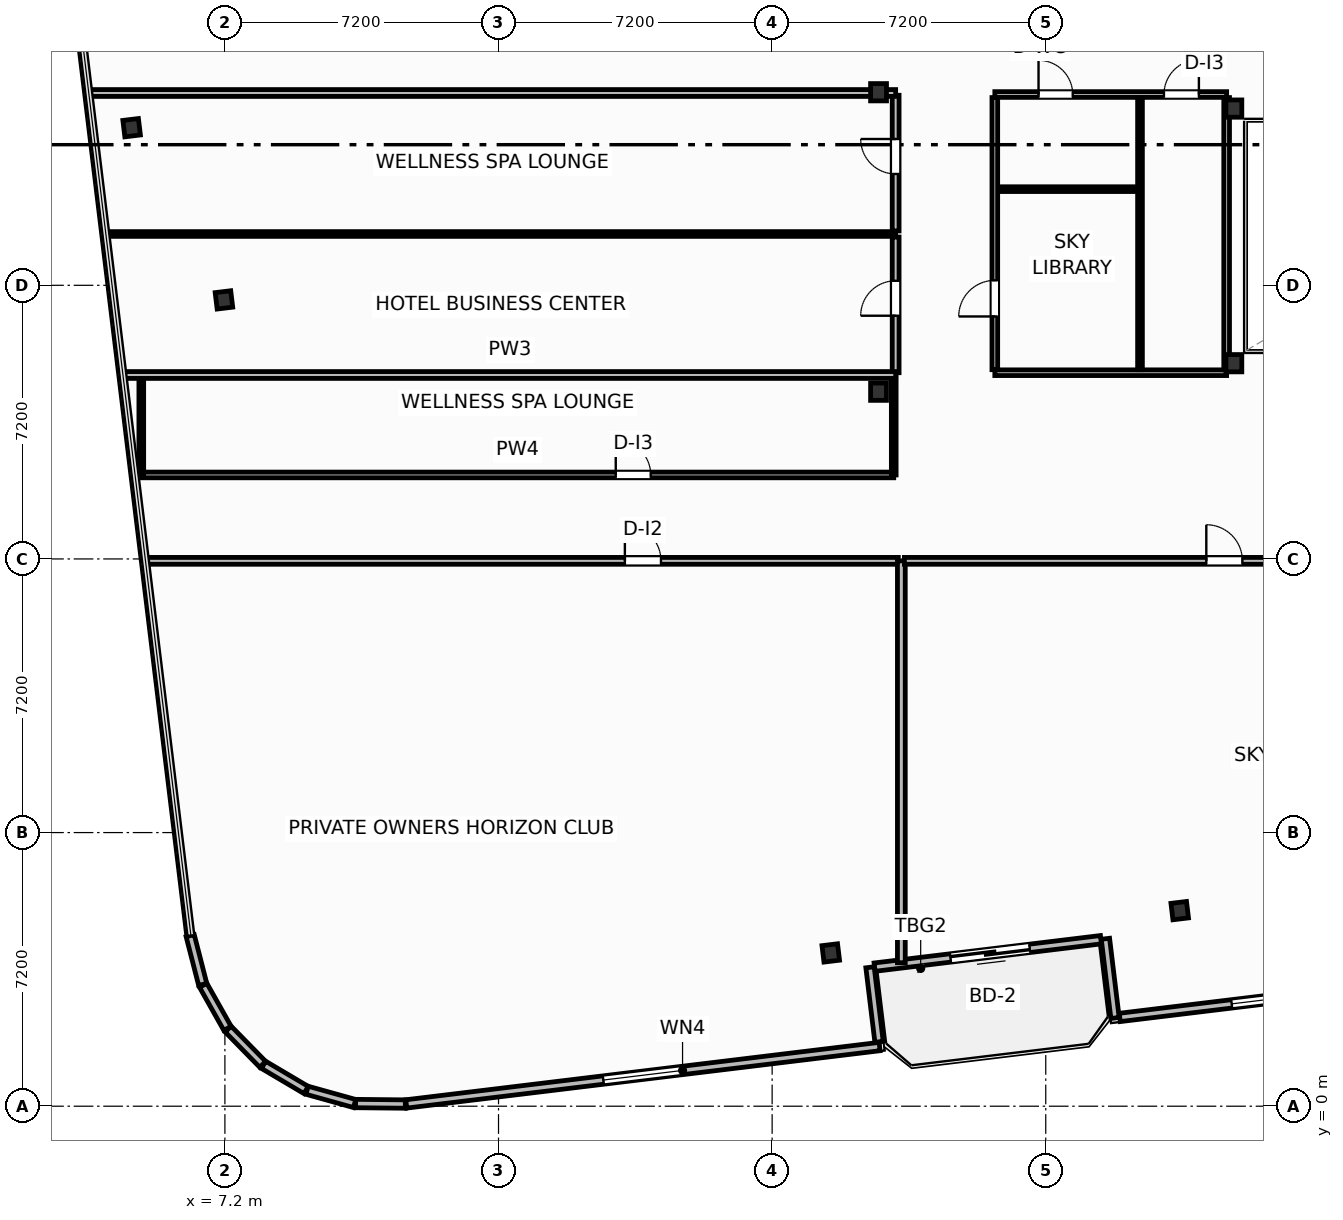
"""IFC4 building model, lengths in metres.
Left out: names, types, materials, properties, quantities, classifications, styles, units other than length and angle.
Written with IfcOpenShell. Run it as: python <this file> out.ifc"""

import sys

from ifc_helpers import new_model, si_unit, direction, frame, frame_2d, origin, origin_2d, place, context, subcontext, project, spatial, rectangle, i_section, extrude, element, fill, save


model = new_model("IFC4")
c1 = context("Model", 3, precision=1e-05, world=origin(), true_north=direction((0.0, 1.0)))
c2 = subcontext(c1, "Body", "Model", "MODEL_VIEW")
j1 = project(units=[si_unit("LENGTHUNIT", "METRE"), si_unit("PLANEANGLEUNIT", "RADIAN")], contexts=[c1])
p1 = place(None, origin())
s1 = spatial("IfcSite", under=j1, at=p1, CompositionType="ELEMENT")
p2 = place(p1, origin())
s2 = spatial("IfcBuilding", under=s1, at=p2, CompositionType="ELEMENT")
p3 = place(p2, frame((0.0, 0.0, 185.7)))
s3 = spatial("IfcBuildingStorey", under=s2, at=p3, CompositionType="ELEMENT", Elevation=185.7)
for number, where, z_axis, x_axis in (
    (1, (33.75, 19.55, 0.0), (0.0, 0.0, 1.0), (1.0, 0.0, 0.0)),
    (2, (33.75, 26.25, 0.0), (0.0, 0.0, 1.0), (1.0, 0.0, 0.0)),
    (3, (24.4, 18.8, 0.0), (0.0, 0.0, 1.0), (1.0, 0.0, 0.0)),
    (4, (24.4, 26.68, 0.0), (0.0, 0.0, 1.0), (1.0, 0.0, 0.0)),
):
    element("IfcColumn", number, at=place(p3, frame(where, z_axis=z_axis, x_axis=x_axis)), inside=s3, PredefinedType="COLUMN", context=c2, shape_type="SweptSolid", body=[
        extrude(i_section(OverallWidth=0.418, OverallDepth=0.455, WebThickness=0.042, FlangeThickness=0.068, FilletRadius=0.025, at=origin_2d()), origin(), (0.0, 0.0, 1.0), 3.7),
    ])
for number, where, z_axis, x_axis in (
    (5, (23.143, 4.033, 0.0), (0.0, 0.0, 1.0), (0.993, 0.12, 0.0)),
    (6, (32.325, 5.146, 0.0), (0.0, 0.0, 1.0), (0.993, 0.12, 0.0)),
    (7, (4.746, 25.747, 0.0), (0.0, 0.0, 1.0), (0.993, 0.12, 0.0)),
    (8, (7.175, 21.216, 0.0), (0.0, 0.0, 1.0), (0.993, 0.12, 0.0)),
):
    element("IfcColumn", number, at=place(p3, frame(where, z_axis=z_axis, x_axis=x_axis)), inside=s3, PredefinedType="COLUMN", context=c2, shape_type="SweptSolid", body=[
        extrude(i_section(OverallWidth=0.412, OverallDepth=0.435, WebThickness=0.036, FlangeThickness=0.057, FilletRadius=0.025, at=origin_2d()), origin(), (0.0, 0.0, 1.0), 3.7),
    ])
p4 = place(p3, frame((30.252, 4.381, 0.0), z_axis=(0.0, 0.0, 1.0), x_axis=(-0.992735402148, -0.120318000826, 0.0)))
e9 = element("IfcWall", 9, at=p4, inside=s3, PredefinedType="SOLIDWALL", context=c2, shape_type="SweptSolid", body=[
    extrude(rectangle(XDim=6.0, YDim=0.22, at=frame_2d((3.0, 0.0))), origin(), (0.0, 0.0, 1.0), 2.73),
])
p5 = place(p4, frame((1.888, 0.0, 0.0)))
e10 = element("IfcOpeningElement", 10, at=p5, cuts=e9, PredefinedType="OPENING", context=c2, shape_type="SweptSolid", body=[
    extrude(rectangle(XDim=2.1, YDim=2.3, at=frame_2d((1.05, 1.15))), frame((0.0, 0.12, 0.0), z_axis=(0.0, -1.0, 0.0), x_axis=(1.0, 0.0, 0.0)), (0.0, 0.0, 1.0), 0.24),
])
p6 = place(p3, frame((6.286, 4.488, 0.0), z_axis=(0.0, 0.0, 1.0), x_axis=(0.248942347653, -0.968518305219, 0.0)))
e11 = element("IfcWall", 11, at=p6, inside=s3, PredefinedType="SOLIDWALL", context=c2, shape_type="SweptSolid", body=[
    extrude(rectangle(XDim=1.326, YDim=0.22, at=frame_2d((0.663, 0.0))), origin(), (0.0, 0.0, 1.0), 2.73),
])
for number, where, z_axis, x_axis in (
    (12, (6.629, 3.182, 0.0), (0.0, 0.0, 1.0), (0.491, -0.871, 0.0)),
    (13, (7.285, 2.031, 0.0), (0.0, 0.0, 1.0), (0.7, -0.714, 0.0)),
    (14, (8.217, 1.089, 0.0), (0.0, 0.0, 1.0), (0.861, -0.509, 0.0)),
):
    element("IfcWall", number, at=place(p3, frame(where, z_axis=z_axis, x_axis=x_axis)), inside=s3, PredefinedType="SOLIDWALL", context=c2, shape_type="SweptSolid", body=[
        extrude(rectangle(XDim=1.301, YDim=0.22, at=frame_2d((0.65, 0.0))), origin(), (0.0, 0.0, 1.0), 2.73),
    ])
p7 = place(p3, frame((9.361, 0.42, 0.0), z_axis=(0.0, 0.0, 1.0), x_axis=(0.963218895288, -0.268717992997, 0.0)))
e15 = element("IfcWall", 15, at=p7, inside=s3, PredefinedType="SOLIDWALL", context=c2, shape_type="SweptSolid", body=[
    extrude(rectangle(XDim=1.301, YDim=0.22, at=frame_2d((0.65, 0.0))), origin(), (0.0, 0.0, 1.0), 2.73),
])
p8 = place(p3, frame((10.639, 0.07, 0.0), z_axis=(0.0, 0.0, 1.0), x_axis=(0.999947377741, -0.010258740119, 0.0)))
e16 = element("IfcWall", 16, at=p8, inside=s3, PredefinedType="SOLIDWALL", context=c2, shape_type="SweptSolid", body=[
    extrude(rectangle(XDim=1.309, YDim=0.22, at=frame_2d((0.654, 0.0))), origin(), (0.0, 0.0, 1.0), 2.73),
])
p9 = place(p3, frame((11.972, 0.06, 0.0), z_axis=(0.0, 0.0, 1.0), x_axis=(0.992732021049, 0.120345894751, 0.0)))
e17 = element("IfcWall", 17, at=p9, inside=s3, PredefinedType="SOLIDWALL", context=c2, shape_type="SweptSolid", body=[
    extrude(rectangle(XDim=12.547, YDim=0.22, at=frame_2d((6.274, 0.0))), origin(), (0.0, 0.0, 1.0), 2.73),
])
p10 = place(p9, frame((5.224, 0.0, 0.8)))
e18 = element("IfcOpeningElement", 18, at=p10, cuts=e17, PredefinedType="OPENING", context=c2, shape_type="SweptSolid", body=[
    extrude(rectangle(XDim=2.1, YDim=1.75, at=frame_2d((1.05, 0.875))), frame((0.0, 0.12, 0.0), z_axis=(0.0, -1.0, 0.0), x_axis=(1.0, 0.0, 0.0)), (0.0, 0.0, 1.0), 0.24),
])
p11 = place(p3, frame((24.413, 1.694, 0.0), z_axis=(0.0, 0.0, 1.0), x_axis=(-0.120290754542, 0.992738703976, 0.0)))
e19 = element("IfcWall", 19, at=p11, inside=s3, PredefinedType="SOLIDWALL", context=c2, shape_type="SweptSolid", body=[
    extrude(rectangle(XDim=1.975, YDim=0.22, at=frame_2d((0.987, 0.0))), origin(), (0.0, 0.0, 1.0), 2.73),
])
p12 = place(p3, frame((30.37, 4.406, 0.0), z_axis=(0.0, 0.0, 1.0), x_axis=(0.120327895535, -0.992734202874, 0.0)))
e20 = element("IfcWall", 20, at=p12, inside=s3, PredefinedType="SOLIDWALL", context=c2, shape_type="SweptSolid", body=[
    extrude(rectangle(XDim=2.1, YDim=0.22, at=frame_2d((1.05, 0.0))), origin(), (0.0, 0.0, 1.0), 2.73),
])
p13 = place(p3, frame((30.747, 2.336, 0.0), z_axis=(0.0, 0.0, 1.0), x_axis=(0.992731032022, 0.120354052946, 0.0)))
e21 = element("IfcWall", 21, at=p13, inside=s3, PredefinedType="SOLIDWALL", context=c2, shape_type="SweptSolid", body=[
    extrude(rectangle(XDim=8.035, YDim=0.22, at=frame_2d((4.018, 0.0))), origin(), (0.0, 0.0, 1.0), 2.73),
])
p14 = place(p13, frame((2.968, 0.0, 0.8)))
e22 = element("IfcOpeningElement", 22, at=p14, cuts=e21, PredefinedType="OPENING", context=c2, shape_type="SweptSolid", body=[
    extrude(rectangle(XDim=2.1, YDim=1.75, at=frame_2d((1.05, 0.875))), frame((0.0, 0.12, 0.0), z_axis=(0.0, -1.0, 0.0), x_axis=(1.0, 0.0, 0.0)), (0.0, 0.0, 1.0), 0.24),
])
p15 = place(p3, frame((5.0, 16.61, 0.0), z_axis=(0.0, 0.0, 1.0), x_axis=(1.0, 0.0, 0.0)))
e23 = element("IfcWall", 23, at=p15, inside=s3, PredefinedType="PARTITIONING", context=c2, shape_type="SweptSolid", body=[
    extrude(rectangle(XDim=19.8, YDim=0.15, at=frame_2d((9.9, 0.0))), origin(), (0.0, 0.0, 1.0), 3.45),
])
p16 = place(p15, frame((12.485, 0.0, 0.0)))
e24 = element("IfcOpeningElement", 24, at=p16, cuts=e23, PredefinedType="OPENING", context=c2, shape_type="SweptSolid", body=[
    extrude(rectangle(XDim=0.92, YDim=2.05, at=frame_2d((0.46, 1.025))), frame((0.0, 0.085, 0.0), z_axis=(0.0, -1.0, 0.0), x_axis=(1.0, 0.0, 0.0)), (0.0, 0.0, 1.0), 0.17),
])
for number, where, z_axis, x_axis in (
    (25, (5.0, 16.61, 0.0), (0.0, 0.0, 1.0), (0.0, 1.0, 0.0)),
    (26, (24.8, 16.61, 0.0), (0.0, 0.0, 1.0), (0.0, 1.0, 0.0)),
):
    element("IfcWall", number, at=place(p3, frame(where, z_axis=z_axis, x_axis=x_axis)), inside=s3, PredefinedType="PARTITIONING", context=c2, shape_type="SweptSolid", body=[
        extrude(rectangle(XDim=2.63, YDim=0.125, at=frame_2d((1.315, 0.0))), origin(), (0.0, 0.0, 1.0), 3.45),
    ])
p17 = place(p3, frame((5.15, 14.35, 0.0), z_axis=(0.0, 0.0, 1.0), x_axis=(1.0, 0.0, 0.0)))
e27 = element("IfcWall", 27, at=p17, inside=s3, PredefinedType="PARTITIONING", context=c2, shape_type="SweptSolid", body=[
    extrude(rectangle(XDim=19.77, YDim=0.18, at=frame_2d((9.885, 0.0))), origin(), (0.0, 0.0, 1.0), 3.45),
])
p18 = place(p17, frame((12.575, 0.0, 0.0)))
e28 = element("IfcOpeningElement", 28, at=p18, cuts=e27, PredefinedType="OPENING", context=c2, shape_type="SweptSolid", body=[
    extrude(rectangle(XDim=0.95, YDim=2.05, at=frame_2d((0.475, 1.025))), frame((0.0, 0.1, 0.0), z_axis=(0.0, -1.0, 0.0), x_axis=(1.0, 0.0, 0.0)), (0.0, 0.0, 1.0), 0.2),
])
p19 = place(p3, frame((25.0, 3.775, 0.0), z_axis=(0.0, 0.0, 1.0), x_axis=(0.0, 1.0, 0.0)))
e29 = element("IfcWall", 29, at=p19, inside=s3, PredefinedType="PARTITIONING", context=c2, shape_type="SweptSolid", body=[
    extrude(rectangle(XDim=10.575, YDim=0.205, at=frame_2d((5.288, 0.0))), origin(), (0.0, 0.0, 1.0), 3.45),
])
p20 = place(p3, frame((25.08, 14.35, 0.0), z_axis=(0.0, 0.0, 1.0), x_axis=(1.0, 0.0, 0.0)))
e30 = element("IfcWall", 30, at=p20, inside=s3, PredefinedType="PARTITIONING", context=c2, shape_type="SweptSolid", body=[
    extrude(rectangle(XDim=16.84, YDim=0.18, at=frame_2d((8.42, 0.0))), origin(), (0.0, 0.0, 1.0), 3.45),
])
p21 = place(p20, frame((7.945, 0.0, 0.0)))
e31 = element("IfcOpeningElement", 31, at=p21, cuts=e30, PredefinedType="OPENING", context=c2, shape_type="SweptSolid", body=[
    extrude(rectangle(XDim=0.95, YDim=2.05, at=frame_2d((0.475, 1.025))), frame((0.0, 0.1, 0.0), z_axis=(0.0, -1.0, 0.0), x_axis=(1.0, 0.0, 0.0)), (0.0, 0.0, 1.0), 0.2),
])
p22 = place(p3, frame((24.85, 19.3, 0.0), z_axis=(0.0, 0.0, 1.0), x_axis=(0.0, 1.0, 0.0)))
e32 = element("IfcWall", 32, at=p22, inside=s3, PredefinedType="PARTITIONING", context=c2, shape_type="SweptSolid", body=[
    extrude(rectangle(XDim=3.57, YDim=0.18, at=frame_2d((1.785, 0.0))), origin(), (0.0, 0.0, 1.0), 3.45),
])
p23 = place(p22, frame((1.5, 0.0, 0.0)))
e33 = element("IfcOpeningElement", 33, at=p23, cuts=e32, PredefinedType="OPENING", context=c2, shape_type="SweptSolid", body=[
    extrude(rectangle(XDim=0.92, YDim=2.05, at=frame_2d((0.46, 1.025))), frame((0.0, 0.1, 0.0), z_axis=(0.0, -1.0, 0.0), x_axis=(1.0, 0.0, 0.0)), (0.0, 0.0, 1.0), 0.2),
])
p24 = place(p3, frame((24.85, 23.03, 0.0), z_axis=(0.0, 0.0, 1.0), x_axis=(0.0, 1.0, 0.0)))
e34 = element("IfcWall", 34, at=p24, inside=s3, PredefinedType="PARTITIONING", context=c2, shape_type="SweptSolid", body=[
    extrude(rectangle(XDim=3.57, YDim=0.18, at=frame_2d((1.785, 0.0))), origin(), (0.0, 0.0, 1.0), 3.45),
])
p25 = place(p24, frame((1.5, 0.0, 0.0)))
e35 = element("IfcOpeningElement", 35, at=p25, cuts=e34, PredefinedType="OPENING", context=c2, shape_type="SweptSolid", body=[
    extrude(rectangle(XDim=0.92, YDim=2.05, at=frame_2d((0.46, 1.025))), frame((0.0, 0.1, 0.0), z_axis=(0.0, -1.0, 0.0), x_axis=(1.0, 0.0, 0.0)), (0.0, 0.0, 1.0), 0.2),
])
p26 = place(p3, frame((4.107, 22.95, 0.0), z_axis=(0.0, 0.0, 1.0), x_axis=(1.0, 0.0, 0.0)))
e36 = element("IfcWall", 36, at=p26, inside=s3, PredefinedType="PARTITIONING", context=c2, shape_type="SweptSolid", body=[
    extrude(rectangle(XDim=20.743, YDim=0.125, at=frame_2d((10.371, 0.0))), origin(), (0.0, 0.0, 1.0), 2.662),
])
p27 = place(p3, frame((4.557, 19.24, 0.0), z_axis=(0.0, 0.0, 1.0), x_axis=(1.0, 0.0, 0.0)))
e37 = element("IfcWall", 37, at=p27, inside=s3, PredefinedType="PARTITIONING", context=c2, shape_type="SweptSolid", body=[
    extrude(rectangle(XDim=20.293, YDim=0.18, at=frame_2d((10.146, 0.0))), origin(), (0.0, 0.0, 1.0), 3.45),
])
p28 = place(p3, frame((3.658, 26.66, 0.0), z_axis=(0.0, 0.0, 1.0), x_axis=(1.0, 0.0, 0.0)))
e38 = element("IfcWall", 38, at=p28, inside=s3, PredefinedType="PARTITIONING", context=c2, shape_type="SweptSolid", body=[
    extrude(rectangle(XDim=21.192, YDim=0.18, at=frame_2d((10.596, 0.0))), origin(), (0.0, 0.0, 1.0), 2.662),
])
p29 = place(p3, frame((27.46, 19.3, 0.0), z_axis=(0.0, 0.0, 1.0), x_axis=(1.0, 0.0, 0.0)))
e39 = element("IfcWall", 39, at=p29, inside=s3, PredefinedType="PARTITIONING", context=c2, shape_type="SweptSolid", body=[
    extrude(rectangle(XDim=6.1, YDim=0.15, at=frame_2d((3.05, 0.0))), origin(), (0.0, 0.0, 1.0), 2.662),
])
p30 = place(p3, frame((27.46, 26.62, 0.0), z_axis=(0.0, 0.0, 1.0), x_axis=(1.0, 0.0, 0.0)))
e40 = element("IfcWall", 40, at=p30, inside=s3, PredefinedType="PARTITIONING", context=c2, shape_type="SweptSolid", body=[
    extrude(rectangle(XDim=6.1, YDim=0.15, at=frame_2d((3.05, 0.0))), origin(), (0.0, 0.0, 1.0), 2.662),
])
p31 = place(p30, frame((1.15, 0.0, 0.0)))
e41 = element("IfcOpeningElement", 41, at=p31, cuts=e40, PredefinedType="OPENING", context=c2, shape_type="SweptSolid", body=[
    extrude(rectangle(XDim=0.9, YDim=2.05, at=frame_2d((0.45, 1.025))), frame((0.0, 0.085, 0.0), z_axis=(0.0, -1.0, 0.0), x_axis=(1.0, 0.0, 0.0)), (0.0, 0.0, 1.0), 0.17),
])
p32 = place(p30, frame((4.45, 0.0, 0.0)))
e42 = element("IfcOpeningElement", 42, at=p32, cuts=e40, PredefinedType="OPENING", context=c2, shape_type="SweptSolid", body=[
    extrude(rectangle(XDim=0.92, YDim=2.05, at=frame_2d((0.46, 1.025))), frame((0.0, 0.085, 0.0), z_axis=(0.0, -1.0, 0.0), x_axis=(1.0, 0.0, 0.0)), (0.0, 0.0, 1.0), 0.17),
])
p33 = place(p3, frame((31.28, 19.38, 0.0), z_axis=(0.0, 0.0, 1.0), x_axis=(0.0, 1.0, 0.0)))
e43 = element("IfcWall", 43, at=p33, inside=s3, PredefinedType="PARTITIONING", context=c2, shape_type="SweptSolid", body=[
    extrude(rectangle(XDim=7.16, YDim=0.125, at=frame_2d((3.58, 0.0))), origin(), (0.0, 0.0, 1.0), 3.45),
])
p34 = place(p3, frame((27.52, 24.13, 0.0), z_axis=(0.0, 0.0, 1.0), x_axis=(1.0, 0.0, 0.0)))
e44 = element("IfcWall", 44, at=p34, inside=s3, PredefinedType="PARTITIONING", context=c2, shape_type="SweptSolid", body=[
    extrude(rectangle(XDim=3.7, YDim=0.125, at=frame_2d((1.85, 0.0))), origin(), (0.0, 0.0, 1.0), 3.45),
])
p35 = place(p3, frame((27.46, 19.38, 0.0), z_axis=(0.0, 0.0, 1.0), x_axis=(0.0, 1.0, 0.0)))
e45 = element("IfcWall", 45, at=p35, inside=s3, PredefinedType="PARTITIONING", context=c2, shape_type="SweptSolid", body=[
    extrude(rectangle(XDim=7.16, YDim=0.15, at=frame_2d((3.58, 0.0))), origin(), (0.0, 0.0, 1.0), 3.45),
])
p36 = place(p35, frame((1.4, 0.0, 0.0)))
e46 = element("IfcOpeningElement", 46, at=p36, cuts=e45, PredefinedType="OPENING", context=c2, shape_type="SweptSolid", body=[
    extrude(rectangle(XDim=0.95, YDim=2.05, at=frame_2d((0.475, 1.025))), frame((0.0, 0.085, 0.0), z_axis=(0.0, -1.0, 0.0), x_axis=(1.0, 0.0, 0.0)), (0.0, 0.0, 1.0), 0.17),
])
p37 = place(p3, frame((33.56, 19.38, 0.0), z_axis=(0.0, 0.0, 1.0), x_axis=(0.0, 1.0, 0.0)))
e47 = element("IfcWall", 47, at=p37, inside=s3, PredefinedType="PARTITIONING", context=c2, shape_type="SweptSolid", body=[
    extrude(rectangle(XDim=7.16, YDim=0.15, at=frame_2d((3.58, 0.0))), origin(), (0.0, 0.0, 1.0), 2.824),
])
p38 = place(p5, origin())
e48 = element("IfcDoor", 48, at=p38, inside=s3, OperationType="SLIDING_TO_LEFT", PredefinedType="DOOR", context=c2, shape_type="SweptSolid", body=[
    extrude(rectangle(XDim=2.1, YDim=2.3, at=frame_2d((1.05, 1.15))), frame((0.0, 0.025, 0.0), z_axis=(0.0, -1.0, 0.0), x_axis=(1.0, 0.0, 0.0)), (0.0, 0.0, 1.0), 0.05),
])
fill(e10, e48)
p39 = place(p10, origin())
e49 = element("IfcWindow", 49, at=p39, inside=s3, PartitioningType="SINGLE_PANEL", PredefinedType="WINDOW", context=c2, shape_type="SweptSolid", body=[
    extrude(rectangle(XDim=2.1, YDim=1.75, at=frame_2d((1.05, 0.875))), frame((0.0, 0.03, 0.0), z_axis=(0.0, -1.0, 0.0), x_axis=(1.0, 0.0, 0.0)), (0.0, 0.0, 1.0), 0.06),
])
fill(e18, e49)
p40 = place(p14, origin())
e50 = element("IfcWindow", 50, at=p40, inside=s3, PartitioningType="SINGLE_PANEL", PredefinedType="WINDOW", context=c2, shape_type="SweptSolid", body=[
    extrude(rectangle(XDim=2.1, YDim=1.75, at=frame_2d((1.05, 0.875))), frame((0.0, 0.03, 0.0), z_axis=(0.0, -1.0, 0.0), x_axis=(1.0, 0.0, 0.0)), (0.0, 0.0, 1.0), 0.06),
])
fill(e22, e50)
p41 = place(p16, origin())
e51 = element("IfcDoor", 51, at=p41, inside=s3, OperationType="SINGLE_SWING_LEFT", PredefinedType="DOOR", context=c2, shape_type="SweptSolid", body=[
    extrude(rectangle(XDim=0.92, YDim=2.05, at=frame_2d((0.46, 1.025))), frame((0.0, 0.025, 0.0), z_axis=(0.0, -1.0, 0.0), x_axis=(1.0, 0.0, 0.0)), (0.0, 0.0, 1.0), 0.05),
])
fill(e24, e51)
p42 = place(p18, origin())
e52 = element("IfcDoor", 52, at=p42, inside=s3, OperationType="SINGLE_SWING_LEFT", PredefinedType="DOOR", context=c2, shape_type="SweptSolid", body=[
    extrude(rectangle(XDim=0.95, YDim=2.05, at=frame_2d((0.475, 1.025))), frame((0.0, 0.025, 0.0), z_axis=(0.0, -1.0, 0.0), x_axis=(1.0, 0.0, 0.0)), (0.0, 0.0, 1.0), 0.05),
])
fill(e28, e52)
p43 = place(p21, origin())
e53 = element("IfcDoor", 53, at=p43, inside=s3, OperationType="SINGLE_SWING_LEFT", PredefinedType="DOOR", context=c2, shape_type="SweptSolid", body=[
    extrude(rectangle(XDim=0.95, YDim=2.05, at=frame_2d((0.475, 1.025))), frame((0.0, 0.025, 0.0), z_axis=(0.0, -1.0, 0.0), x_axis=(1.0, 0.0, 0.0)), (0.0, 0.0, 1.0), 0.05),
])
fill(e31, e53)
p44 = place(p23, origin())
e54 = element("IfcDoor", 54, at=p44, inside=s3, OperationType="SINGLE_SWING_LEFT", PredefinedType="DOOR", context=c2, shape_type="SweptSolid", body=[
    extrude(rectangle(XDim=0.92, YDim=2.05, at=frame_2d((0.46, 1.025))), frame((0.0, 0.025, 0.0), z_axis=(0.0, -1.0, 0.0), x_axis=(1.0, 0.0, 0.0)), (0.0, 0.0, 1.0), 0.05),
])
fill(e33, e54)
p45 = place(p25, origin())
e55 = element("IfcDoor", 55, at=p45, inside=s3, OperationType="SINGLE_SWING_RIGHT", PredefinedType="DOOR", context=c2, shape_type="SweptSolid", body=[
    extrude(rectangle(XDim=0.92, YDim=2.05, at=frame_2d((0.46, 1.025))), frame((0.0, 0.025, 0.0), z_axis=(0.0, -1.0, 0.0), x_axis=(1.0, 0.0, 0.0)), (0.0, 0.0, 1.0), 0.05),
])
fill(e35, e55)
p46 = place(p31, origin())
e56 = element("IfcDoor", 56, at=p46, inside=s3, OperationType="SINGLE_SWING_LEFT", PredefinedType="DOOR", context=c2, shape_type="SweptSolid", body=[
    extrude(rectangle(XDim=0.9, YDim=2.05, at=frame_2d((0.45, 1.025))), frame((0.0, 0.025, 0.0), z_axis=(0.0, -1.0, 0.0), x_axis=(1.0, 0.0, 0.0)), (0.0, 0.0, 1.0), 0.05),
])
fill(e41, e56)
p47 = place(p32, origin())
e57 = element("IfcDoor", 57, at=p47, inside=s3, OperationType="SINGLE_SWING_RIGHT", PredefinedType="DOOR", context=c2, shape_type="SweptSolid", body=[
    extrude(rectangle(XDim=0.92, YDim=2.05, at=frame_2d((0.46, 1.025))), frame((0.0, 0.025, 0.0), z_axis=(0.0, -1.0, 0.0), x_axis=(1.0, 0.0, 0.0)), (0.0, 0.0, 1.0), 0.05),
])
fill(e42, e57)
p48 = place(p36, origin())
e58 = element("IfcDoor", 58, at=p48, inside=s3, OperationType="SINGLE_SWING_LEFT", PredefinedType="DOOR", context=c2, shape_type="SweptSolid", body=[
    extrude(rectangle(XDim=0.95, YDim=2.05, at=frame_2d((0.475, 1.025))), frame((0.0, 0.025, 0.0), z_axis=(0.0, -1.0, 0.0), x_axis=(1.0, 0.0, 0.0)), (0.0, 0.0, 1.0), 0.05),
])
fill(e46, e58)
save(model, sys.argv[1])
